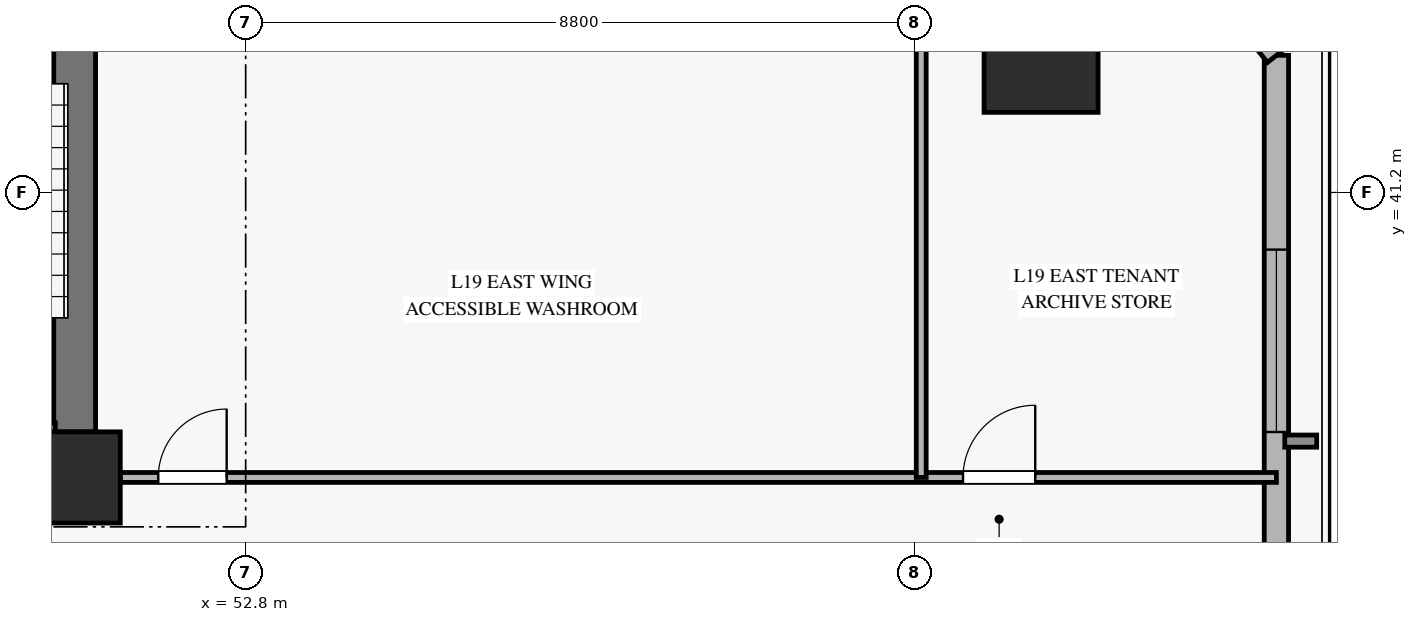
"""IFC4 building model, lengths in metres.
Left out: names, types, materials, properties, quantities, classifications, styles, units other than length and angle.
Written with IfcOpenShell. Run it as: python <this file> out.ifc"""

import sys

from ifc_helpers import new_model, si_unit, direction, frame, frame_2d, origin, origin_2d, place, context, subcontext, project, spatial, rectangle, hollow_rectangle, extrude, source, transform, mapped, element, fill, save


model = new_model("IFC4")
c1 = context("Model", 3, precision=1e-05, world=origin(), true_north=direction((0.0, 1.0)))
c2 = subcontext(c1, "Body", "Model", "MODEL_VIEW")
j1 = project(units=[si_unit("LENGTHUNIT", "METRE"), si_unit("PLANEANGLEUNIT", "RADIAN")], contexts=[c1])
p1 = place(None, origin())
s1 = spatial("IfcSite", under=j1, at=p1, CompositionType="ELEMENT")
p2 = place(p1, origin())
s2 = spatial("IfcBuilding", under=s1, at=p2, CompositionType="ELEMENT")
p3 = place(p2, frame((0.0, 0.0, 79.6)))
s3 = spatial("IfcBuildingStorey", under=s2, at=p3, CompositionType="ELEMENT", Elevation=79.6)
m1 = source(origin(), c2, "Body", "SweptSolid", [
    extrude(rectangle(XDim=1.2, YDim=1.2, at=origin_2d()), origin(), (0.0, 0.0, 1.0), 3.68),
])
p4 = place(p3, frame((50.55, 37.45, 0.0), z_axis=(0.0, 0.0, 1.0), x_axis=(1.0, 0.0, 0.0)))
e1 = element("IfcColumn", 1, at=p4, inside=s3, PredefinedType="PILASTER", context=c2, shape_type="MappedRepresentation", body=[
    mapped(m1, transform((0.0, 0.0, 0.0), x_axis=(1.0, 0.0, 0.0), y_axis=(0.0, 1.0, 0.0), z_axis=(0.0, 0.0, 1.0), scale=1.0)),
])
p5 = place(p3, frame((50.55, 38.05, 0.0), z_axis=(0.0, 0.0, 1.0), x_axis=(0.0, 1.0, 0.0)))
e2 = element("IfcWall", 2, at=p5, inside=s3, PredefinedType="SHEAR", context=c2, shape_type="SweptSolid", body=[
    extrude(rectangle(XDim=7.9, YDim=0.55, at=frame_2d((3.95, 0.0))), origin(), (0.0, 0.0, 1.0), 3.68),
])
m2 = source(origin(), c2, "Body", "SweptSolid", [
    extrude(hollow_rectangle(XDim=1.5, YDim=1.5, WallThickness=0.07, at=origin_2d()), origin(), (0.0, 0.0, 1.0), 3.68),
])
p6 = place(p3, frame((63.265, 43.004, 0.0), z_axis=(0.0, 0.0, 1.0), x_axis=(1.0, 0.0, 0.0)))
e3 = element("IfcColumn", 3, at=p6, inside=s3, PredefinedType="COLUMN", context=c2, shape_type="MappedRepresentation", body=[
    mapped(m2, transform((0.0, 0.0, 0.0), x_axis=(1.0, 0.0, 0.0), y_axis=(0.0, 1.0, 0.0), z_axis=(0.0, 0.0, 1.0), scale=1.0)),
])
p7 = place(p3, frame((66.361, 26.255, 0.0), z_axis=(0.0, 0.0, 1.0), x_axis=(0.0, 1.0, 0.0)))
e4 = element("IfcWall", 4, at=p7, inside=s3, PredefinedType="SOLIDWALL", context=c2, shape_type="SweptSolid", body=[
    extrude(rectangle(XDim=16.749, YDim=0.32, at=frame_2d((8.375, 0.0))), origin(), (0.0, 0.0, 1.0), 3.16),
])
p8 = place(p7, frame((0.75, 0.0, 0.45)))
e5 = element("IfcOpeningElement", 5, at=p8, cuts=e4, PredefinedType="OPENING", context=c2, shape_type="SweptSolid", body=[
    extrude(rectangle(XDim=2.4, YDim=2.1, at=frame_2d((1.2, 1.05))), frame((0.0, 0.17, 0.0), z_axis=(0.0, -1.0, 0.0), x_axis=(1.0, 0.0, 0.0)), (0.0, 0.0, 1.0), 0.34),
])
p9 = place(p7, frame((11.793, 0.0, 0.45)))
e6 = element("IfcOpeningElement", 6, at=p9, cuts=e4, PredefinedType="OPENING", context=c2, shape_type="SweptSolid", body=[
    extrude(rectangle(XDim=2.4, YDim=2.1, at=frame_2d((1.2, 1.05))), frame((0.0, 0.17, 0.0), z_axis=(0.0, -1.0, 0.0), x_axis=(1.0, 0.0, 0.0)), (0.0, 0.0, 1.0), 0.34),
])
p10 = place(p3, frame((66.361, 43.004, 0.0), z_axis=(0.0, 0.0, 1.0), x_axis=(-0.624594762048, 0.780949027288, 0.0)))
e7 = element("IfcWall", 7, at=p10, inside=s3, PredefinedType="SOLIDWALL", context=c2, shape_type="SweptSolid", body=[
    extrude(rectangle(XDim=4.156, YDim=0.3, at=frame_2d((2.078, 0.0))), origin(), (0.0, 0.0, 1.0), 3.16),
])
p11 = place(p10, frame((1.278, 0.0, 0.45)))
e8 = element("IfcOpeningElement", 8, at=p11, cuts=e7, PredefinedType="OPENING", context=c2, shape_type="SweptSolid", body=[
    extrude(rectangle(XDim=1.6, YDim=2.0, at=frame_2d((0.8, 1.0))), frame((0.0, 0.16, 0.0), z_axis=(0.0, -1.0, 0.0), x_axis=(1.0, 0.0, 0.0)), (0.0, 0.0, 1.0), 0.32),
])
p12 = place(p3, frame((47.44, 38.07, 0.0), z_axis=(0.0, 0.0, 1.0), x_axis=(1.0, 0.0, 0.0)))
e9 = element("IfcWall", 9, at=p12, inside=s3, PredefinedType="SOLIDWALL", context=c2, shape_type="SweptSolid", body=[
    extrude(rectangle(XDim=2.855, YDim=0.2, at=frame_2d((1.427, 0.0))), origin(), (0.0, 0.0, 1.0), 3.9),
])
p13 = place(p3, frame((51.15, 37.45, 0.0), z_axis=(0.0, 0.0, 1.0), x_axis=(1.0, 0.0, 0.0)))
e10 = element("IfcWall", 10, at=p13, inside=s3, PredefinedType="PARTITIONING", context=c2, shape_type="SweptSolid", body=[
    extrude(rectangle(XDim=15.211, YDim=0.13, at=frame_2d((7.605, 0.0))), origin(), (0.0, 0.0, 1.0), 3.165),
])
p14 = place(p13, frame((0.5, 0.0, 0.0)))
e11 = element("IfcOpeningElement", 11, at=p14, cuts=e10, PredefinedType="OPENING", context=c2, shape_type="SweptSolid", body=[
    extrude(rectangle(XDim=0.9, YDim=2.1, at=frame_2d((0.45, 1.05))), frame((0.0, 0.075, 0.0), z_axis=(0.0, -1.0, 0.0), x_axis=(1.0, 0.0, 0.0)), (0.0, 0.0, 1.0), 0.15),
])
p15 = place(p13, frame((11.088, 0.0, 0.0)))
e12 = element("IfcOpeningElement", 12, at=p15, cuts=e10, PredefinedType="OPENING", context=c2, shape_type="SweptSolid", body=[
    extrude(rectangle(XDim=0.95, YDim=2.1, at=frame_2d((0.475, 1.05))), frame((0.0, 0.075, 0.0), z_axis=(0.0, -1.0, 0.0), x_axis=(1.0, 0.0, 0.0)), (0.0, 0.0, 1.0), 0.15),
])
p16 = place(p3, frame((61.688, 37.45, 0.0), z_axis=(0.0, 0.0, 1.0), x_axis=(0.0, 1.0, 0.0)))
e13 = element("IfcWall", 13, at=p16, inside=s3, PredefinedType="PARTITIONING", context=c2, shape_type="SweptSolid", body=[
    extrude(rectangle(XDim=8.8, YDim=0.13, at=frame_2d((4.4, 0.0))), origin(), (0.0, 0.0, 1.0), 3.68),
])
m3 = source(origin(), c2, "Body", "SweptSolid", [
    extrude(rectangle(XDim=2.4, YDim=2.1, at=frame_2d((1.2, 1.05))), frame((0.0, 0.03, 0.0), z_axis=(0.0, -1.0, 0.0), x_axis=(1.0, 0.0, 0.0)), (0.0, 0.0, 1.0), 0.06),
])
p17 = place(p9, origin())
e14 = element("IfcWindow", 14, at=p17, inside=s3, PartitioningType="SINGLE_PANEL", PredefinedType="WINDOW", context=c2, shape_type="MappedRepresentation", body=[
    mapped(m3, transform((0.0, 0.0, 0.0), x_axis=(1.0, 0.0, 0.0), y_axis=(0.0, 1.0, 0.0), z_axis=(0.0, 0.0, 1.0), scale=1.0)),
])
fill(e6, e14)
m4 = source(origin(), c2, "Body", "SweptSolid", [
    extrude(rectangle(XDim=0.9, YDim=2.1, at=frame_2d((0.45, 1.05))), frame((0.0, 0.025, 0.0), z_axis=(0.0, -1.0, 0.0), x_axis=(1.0, 0.0, 0.0)), (0.0, 0.0, 1.0), 0.05),
])
p18 = place(p14, origin())
e15 = element("IfcDoor", 15, at=p18, inside=s3, OperationType="SINGLE_SWING_RIGHT", PredefinedType="DOOR", context=c2, shape_type="MappedRepresentation", body=[
    mapped(m4, transform((0.0, 0.0, 0.0), x_axis=(1.0, 0.0, 0.0), y_axis=(0.0, 1.0, 0.0), z_axis=(0.0, 0.0, 1.0), scale=1.0)),
])
fill(e11, e15)
m5 = source(origin(), c2, "Body", "SweptSolid", [
    extrude(rectangle(XDim=0.95, YDim=2.1, at=frame_2d((0.475, 1.05))), frame((0.0, 0.025, 0.0), z_axis=(0.0, -1.0, 0.0), x_axis=(1.0, 0.0, 0.0)), (0.0, 0.0, 1.0), 0.05),
])
p19 = place(p15, origin())
e16 = element("IfcDoor", 16, at=p19, inside=s3, OperationType="SINGLE_SWING_RIGHT", PredefinedType="DOOR", context=c2, shape_type="MappedRepresentation", body=[
    mapped(m5, transform((0.0, 0.0, 0.0), x_axis=(1.0, 0.0, 0.0), y_axis=(0.0, 1.0, 0.0), z_axis=(0.0, 0.0, 1.0), scale=1.0)),
])
fill(e12, e16)
save(model, sys.argv[1])
